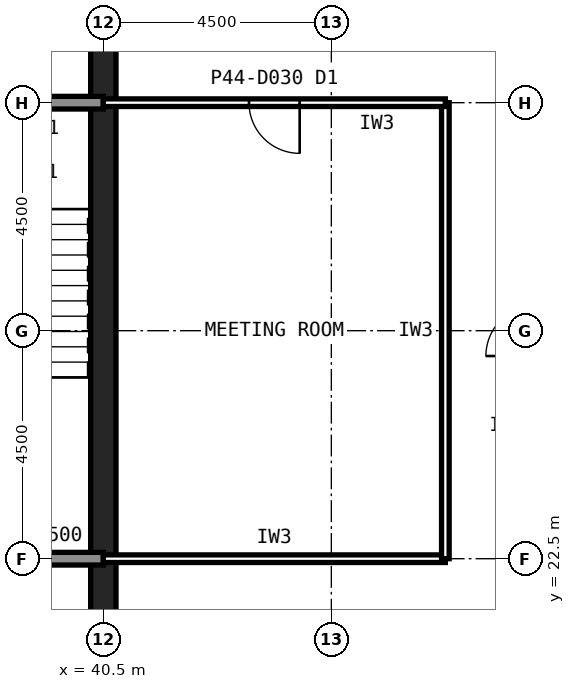
"""IFC4 building model, lengths in metres.
Left out: names, types, materials, properties, quantities, classifications, styles, units other than length and angle.
Written with IfcOpenShell. Run it as: python <this file> out.ifc"""

import sys

from ifc_helpers import new_model, si_unit, direction, frame, frame_2d, origin, place, context, subcontext, project, spatial, rectangle, extrude, element, fill, save


model = new_model("IFC4")
c1 = context("Model", 3, precision=1e-05, world=origin(), true_north=direction((0.0, 1.0)))
c2 = subcontext(c1, "Body", "Model", "MODEL_VIEW")
j1 = project(units=[si_unit("LENGTHUNIT", "METRE"), si_unit("PLANEANGLEUNIT", "RADIAN")], contexts=[c1])
p1 = place(None, origin())
s1 = spatial("IfcSite", under=j1, at=p1, CompositionType="ELEMENT")
p2 = place(p1, origin())
s2 = spatial("IfcBuilding", under=s1, at=p2, CompositionType="ELEMENT")
p3 = place(p2, frame((0.0, 0.0, 183.6)))
s3 = spatial("IfcBuildingStorey", under=s2, at=p3, CompositionType="ELEMENT", Elevation=183.6)
p4 = place(p3, frame((40.5, 13.5, 0.0), z_axis=(0.0, 0.0, 1.0), x_axis=(0.0, 1.0, 0.0)))
e1 = element("IfcWall", 1, at=p4, inside=s3, PredefinedType="SHEAR", context=c2, shape_type="SweptSolid", body=[
    extrude(rectangle(XDim=27.0, YDim=0.5, at=frame_2d((13.5, 0.0))), origin(), (0.0, 0.0, 1.0), 4.0),
])
p5 = place(p4, frame((5.85, 0.0, 0.0)))
e2 = element("IfcOpeningElement", 2, at=p5, cuts=e1, PredefinedType="OPENING", context=c2, shape_type="SweptSolid", body=[
    extrude(rectangle(XDim=1.8, YDim=2.1, at=frame_2d((0.9, 1.05))), frame((0.0, 0.26, 0.0), z_axis=(0.0, -1.0, 0.0), x_axis=(1.0, 0.0, 0.0)), (0.0, 0.0, 1.0), 0.52),
])
p6 = place(p4, frame((19.65, 0.0, 0.0)))
e3 = element("IfcOpeningElement", 3, at=p6, cuts=e1, PredefinedType="OPENING", context=c2, shape_type="SweptSolid", body=[
    extrude(rectangle(XDim=1.2, YDim=2.1, at=frame_2d((0.6, 1.05))), frame((0.0, 0.26, 0.0), z_axis=(0.0, -1.0, 0.0), x_axis=(1.0, 0.0, 0.0)), (0.0, 0.0, 1.0), 0.52),
])
p7 = place(p3, frame((13.5, 22.5, 0.0), z_axis=(0.0, 0.0, 1.0), x_axis=(1.0, 0.0, 0.0)))
e4 = element("IfcWall", 4, at=p7, inside=s3, PredefinedType="SOLIDWALL", context=c2, shape_type="SweptSolid", body=[
    extrude(rectangle(XDim=27.0, YDim=0.25, at=frame_2d((13.5, 0.0))), origin(), (0.0, 0.0, 1.0), 3.84),
])
p8 = place(p7, frame((1.65, 0.0, 0.0)))
e5 = element("IfcOpeningElement", 5, at=p8, cuts=e4, PredefinedType="OPENING", context=c2, shape_type="SweptSolid", body=[
    extrude(rectangle(XDim=1.2, YDim=2.1, at=frame_2d((0.6, 1.05))), frame((0.0, 0.135, 0.0), z_axis=(0.0, -1.0, 0.0), x_axis=(1.0, 0.0, 0.0)), (0.0, 0.0, 1.0), 0.27),
])
p9 = place(p7, frame((6.025, 0.0, 0.0)))
e6 = element("IfcOpeningElement", 6, at=p9, cuts=e4, PredefinedType="OPENING", context=c2, shape_type="SweptSolid", body=[
    extrude(rectangle(XDim=1.0, YDim=2.1, at=frame_2d((0.5, 1.05))), frame((0.0, 0.135, 0.0), z_axis=(0.0, -1.0, 0.0), x_axis=(1.0, 0.0, 0.0)), (0.0, 0.0, 1.0), 0.27),
])
p10 = place(p7, frame((10.525, 0.0, 0.0)))
e7 = element("IfcOpeningElement", 7, at=p10, cuts=e4, PredefinedType="OPENING", context=c2, shape_type="SweptSolid", body=[
    extrude(rectangle(XDim=1.0, YDim=2.1, at=frame_2d((0.5, 1.05))), frame((0.0, 0.135, 0.0), z_axis=(0.0, -1.0, 0.0), x_axis=(1.0, 0.0, 0.0)), (0.0, 0.0, 1.0), 0.27),
])
p11 = place(p7, frame((19.75, 0.0, 0.0)))
e8 = element("IfcOpeningElement", 8, at=p11, cuts=e4, PredefinedType="OPENING", context=c2, shape_type="SweptSolid", body=[
    extrude(rectangle(XDim=1.0, YDim=2.1, at=frame_2d((0.5, 1.05))), frame((0.0, 0.135, 0.0), z_axis=(0.0, -1.0, 0.0), x_axis=(1.0, 0.0, 0.0)), (0.0, 0.0, 1.0), 0.27),
])
p12 = place(p7, frame((15.05, 0.0, 0.0)))
e9 = element("IfcOpeningElement", 9, at=p12, cuts=e4, PredefinedType="OPENING", context=c2, shape_type="SweptSolid", body=[
    extrude(rectangle(XDim=1.4, YDim=2.4, at=frame_2d((0.7, 1.2))), frame((0.0, 0.135, 0.0), z_axis=(0.0, -1.0, 0.0), x_axis=(1.0, 0.0, 0.0)), (0.0, 0.0, 1.0), 0.27),
])
p13 = place(p3, frame((13.5, 31.5, 0.0), z_axis=(0.0, 0.0, 1.0), x_axis=(1.0, 0.0, 0.0)))
e10 = element("IfcWall", 10, at=p13, inside=s3, PredefinedType="SOLIDWALL", context=c2, shape_type="SweptSolid", body=[
    extrude(rectangle(XDim=27.0, YDim=0.25, at=frame_2d((13.5, 0.0))), origin(), (0.0, 0.0, 1.0), 3.84),
])
p14 = place(p13, frame((24.15, 0.0, 0.0)))
e11 = element("IfcOpeningElement", 11, at=p14, cuts=e10, PredefinedType="OPENING", context=c2, shape_type="SweptSolid", body=[
    extrude(rectangle(XDim=1.2, YDim=2.1, at=frame_2d((0.6, 1.05))), frame((0.0, 0.135, 0.0), z_axis=(0.0, -1.0, 0.0), x_axis=(1.0, 0.0, 0.0)), (0.0, 0.0, 1.0), 0.27),
])
p15 = place(p13, frame((15.3, 0.0, 0.0)))
e12 = element("IfcOpeningElement", 12, at=p15, cuts=e10, PredefinedType="OPENING", context=c2, shape_type="SweptSolid", body=[
    extrude(rectangle(XDim=0.9, YDim=2.1, at=frame_2d((0.45, 1.05))), frame((0.0, 0.135, 0.0), z_axis=(0.0, -1.0, 0.0), x_axis=(1.0, 0.0, 0.0)), (0.0, 0.0, 1.0), 0.27),
])
p16 = place(p13, frame((19.8, 0.0, 0.0)))
e13 = element("IfcOpeningElement", 13, at=p16, cuts=e10, PredefinedType="OPENING", context=c2, shape_type="SweptSolid", body=[
    extrude(rectangle(XDim=0.9, YDim=2.1, at=frame_2d((0.45, 1.05))), frame((0.0, 0.135, 0.0), z_axis=(0.0, -1.0, 0.0), x_axis=(1.0, 0.0, 0.0)), (0.0, 0.0, 1.0), 0.27),
])
p17 = place(p3, frame((40.5, 22.5, 0.0), z_axis=(0.0, 0.0, 1.0), x_axis=(1.0, 0.0, 0.0)))
e14 = element("IfcWall", 14, at=p17, inside=s3, PredefinedType="PARTITIONING", context=c2, shape_type="SweptSolid", body=[
    extrude(rectangle(XDim=6.75, YDim=0.15, at=frame_2d((3.375, 0.0))), origin(), (0.0, 0.0, 1.0), 2.989),
])
p18 = place(p3, frame((47.25, 22.5, 0.0), z_axis=(0.0, 0.0, 1.0), x_axis=(0.0, 1.0, 0.0)))
e15 = element("IfcWall", 15, at=p18, inside=s3, PredefinedType="PARTITIONING", context=c2, shape_type="SweptSolid", body=[
    extrude(rectangle(XDim=9.0, YDim=0.15, at=frame_2d((4.5, 0.0))), origin(), (0.0, 0.0, 1.0), 3.84),
])
p19 = place(p3, frame((47.25, 31.5, 0.0), z_axis=(0.0, 0.0, 1.0), x_axis=(-1.0, 0.0, 0.0)))
e16 = element("IfcWall", 16, at=p19, inside=s3, PredefinedType="PARTITIONING", context=c2, shape_type="SweptSolid", body=[
    extrude(rectangle(XDim=6.75, YDim=0.15, at=frame_2d((3.375, 0.0))), origin(), (0.0, 0.0, 1.0), 2.989),
])
p20 = place(p19, frame((2.875, 0.0, 0.0)))
e17 = element("IfcOpeningElement", 17, at=p20, cuts=e16, PredefinedType="OPENING", context=c2, shape_type="SweptSolid", body=[
    extrude(rectangle(XDim=1.0, YDim=2.1, at=frame_2d((0.5, 1.05))), frame((0.0, 0.085, 0.0), z_axis=(0.0, -1.0, 0.0), x_axis=(1.0, 0.0, 0.0)), (0.0, 0.0, 1.0), 0.17),
])
p21 = place(p20, origin())
e18 = element("IfcDoor", 18, at=p21, inside=s3, OperationType="SINGLE_SWING_LEFT", PredefinedType="DOOR", context=c2, shape_type="SweptSolid", body=[
    extrude(rectangle(XDim=1.0, YDim=2.1, at=frame_2d((0.5, 1.05))), frame((0.0, 0.025, 0.0), z_axis=(0.0, -1.0, 0.0), x_axis=(1.0, 0.0, 0.0)), (0.0, 0.0, 1.0), 0.05),
])
fill(e17, e18)
save(model, sys.argv[1])
